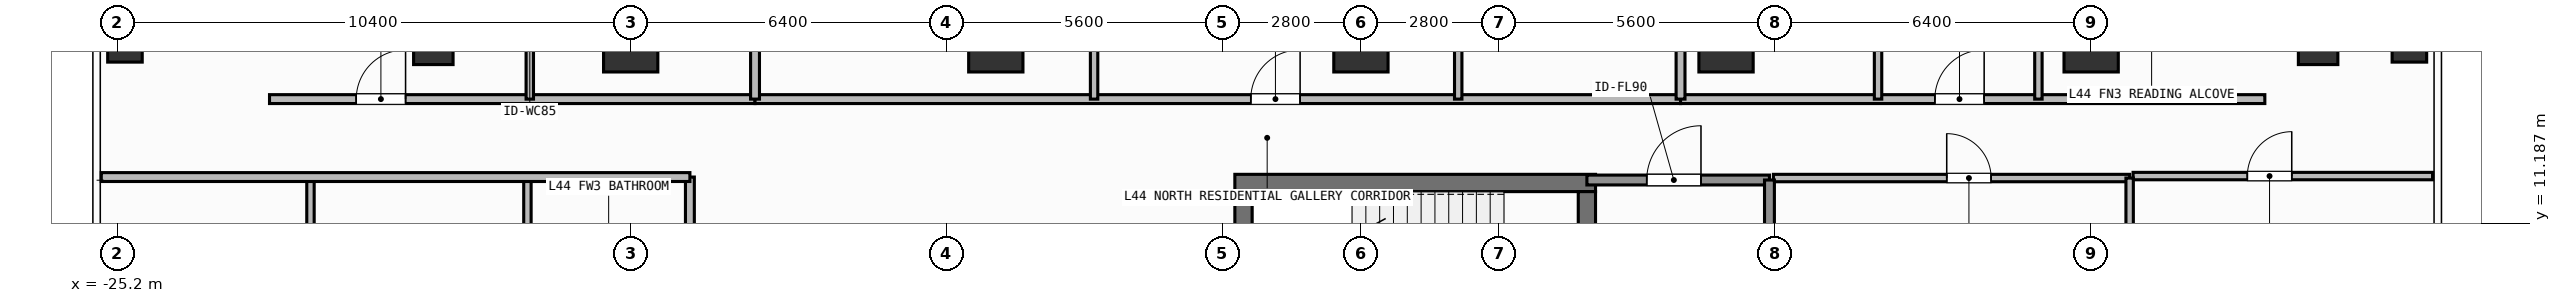
"""IFC4 building model, lengths in metres.
Left out: names, types, materials, properties, quantities, classifications, styles, units other than length and angle.
Written with IfcOpenShell. Run it as: python <this file> out.ifc"""

import sys

from ifc_helpers import new_model, si_unit, direction, frame, frame_2d, origin, origin_2d, place, context, subcontext, project, spatial, rectangle, hollow_rectangle, extrude, element, fill, save


model = new_model("IFC4")
c1 = context("Model", 3, precision=1e-05, world=origin(), true_north=direction((0.0, 1.0)))
c2 = subcontext(c1, "Body", "Model", "MODEL_VIEW")
j1 = project(units=[si_unit("LENGTHUNIT", "METRE"), si_unit("PLANEANGLEUNIT", "RADIAN")], contexts=[c1])
p1 = place(None, origin())
s1 = spatial("IfcSite", under=j1, at=p1, CompositionType="ELEMENT")
p2 = place(p1, origin())
s2 = spatial("IfcBuilding", under=s1, at=p2, CompositionType="ELEMENT")
p3 = place(p2, frame((0.0, 0.0, 179.7)))
s3 = spatial("IfcBuildingStorey", under=s2, at=p3, CompositionType="ELEMENT", Elevation=179.7)
p4 = place(p3, frame((-2.555, 12.0, 0.0), z_axis=(0.0, 0.0, 1.0), x_axis=(1.0, 0.0, 0.0)))
e1 = element("IfcWall", 1, at=p4, inside=s3, PredefinedType="SHEAR", context=c2, shape_type="SweptSolid", body=[
    extrude(rectangle(XDim=7.31, YDim=0.35, at=frame_2d((3.655, 0.0))), origin(), (0.0, 0.0, 1.0), 3.9),
])
p5 = place(p3, frame((-2.38, 8.9, 0.0), z_axis=(0.0, 0.0, 1.0), x_axis=(0.0, 1.0, 0.0)))
e2 = element("IfcWall", 2, at=p5, inside=s3, PredefinedType="SHEAR", context=c2, shape_type="SweptSolid", body=[
    extrude(rectangle(XDim=2.925, YDim=0.35, at=frame_2d((1.462, 0.0))), origin(), (0.0, 0.0, 1.0), 3.9),
])
p6 = place(p3, frame((4.58, 11.825, 0.0), z_axis=(0.0, 0.0, 1.0), x_axis=(0.0, -1.0, 0.0)))
e3 = element("IfcWall", 3, at=p6, inside=s3, PredefinedType="SHEAR", context=c2, shape_type="SweptSolid", body=[
    extrude(rectangle(XDim=2.925, YDim=0.35, at=frame_2d((1.462, 0.0))), origin(), (0.0, 0.0, 1.0), 3.9),
])
p7 = place(p6, frame((0.913, 0.0, 0.0)))
e4 = element("IfcOpeningElement", 4, at=p7, cuts=e3, PredefinedType="OPENING", context=c2, shape_type="SweptSolid", body=[
    extrude(rectangle(XDim=1.1, YDim=2.15, at=frame_2d((0.55, 1.075))), frame((0.0, 0.185, 0.0), z_axis=(0.0, -1.0, 0.0), x_axis=(1.0, 0.0, 0.0)), (0.0, 0.0, 1.0), 0.37),
])
for number, where, z_axis, x_axis in (
    (5, (-14.8, 14.8, 0.0), (0.0, 0.0, 1.0), (1.0, 0.0, 0.0)),
    (6, (-7.4, 14.8, 0.0), (0.0, 0.0, 1.0), (1.0, 0.0, 0.0)),
    (7, (0.0, 14.8, 0.0), (0.0, 0.0, 1.0), (1.0, 0.0, 0.0)),
    (8, (7.4, 14.8, 0.0), (0.0, 0.0, 1.0), (1.0, 0.0, 0.0)),
    (9, (14.8, 14.8, 0.0), (0.0, 0.0, 1.0), (1.0, 0.0, 0.0)),
):
    element("IfcColumn", number, at=place(p3, frame(where, z_axis=z_axis, x_axis=x_axis)), inside=s3, PredefinedType="COLUMN", context=c2, shape_type="SweptSolid", body=[
        extrude(rectangle(XDim=1.1, YDim=1.1, at=origin_2d()), origin(), (0.0, 0.0, 1.0), 3.9),
    ])
for number, where, z_axis, x_axis in (
    (10, (-18.8, 14.8, 0.0), (0.0, 0.0, 1.0), (1.0, 0.0, 0.0)),
    (11, (19.4, 14.8, 0.0), (0.0, 0.0, 1.0), (1.0, 0.0, 0.0)),
):
    element("IfcColumn", number, at=place(p3, frame(where, z_axis=z_axis, x_axis=x_axis)), inside=s3, PredefinedType="COLUMN", context=c2, shape_type="SweptSolid", body=[
        extrude(hollow_rectangle(XDim=0.8, YDim=0.8, WallThickness=0.036, at=origin_2d()), origin(), (0.0, 0.0, 1.0), 3.9),
    ])
for number, where, z_axis, x_axis in (
    (12, (-25.05, 14.8, 0.0), (0.0, 0.0, 1.0), (1.0, 0.0, 0.0)),
    (13, (21.25, 14.8, 0.0), (0.0, 0.0, 1.0), (1.0, 0.0, 0.0)),
):
    element("IfcColumn", number, at=place(p3, frame(where, z_axis=z_axis, x_axis=x_axis)), inside=s3, PredefinedType="COLUMN", context=c2, shape_type="SweptSolid", body=[
        extrude(hollow_rectangle(XDim=0.7, YDim=0.7, WallThickness=0.032, at=origin_2d()), origin(), (0.0, 0.0, 1.0), 3.9),
    ])
p8 = place(p3, frame((4.58, 12.06, 0.0), z_axis=(0.0, 0.0, 1.0), x_axis=(1.0, 0.0, 0.0)))
e14 = element("IfcWall", 14, at=p8, inside=s3, PredefinedType="SOLIDWALL", context=c2, shape_type="SweptSolid", body=[
    extrude(rectangle(XDim=3.7, YDim=0.2, at=frame_2d((1.85, 0.0))), origin(), (0.0, 0.0, 1.0), 3.68),
])
p9 = place(p8, frame((1.212, 0.0, 0.0)))
e15 = element("IfcOpeningElement", 15, at=p9, cuts=e14, PredefinedType="OPENING", context=c2, shape_type="SweptSolid", body=[
    extrude(rectangle(XDim=1.1, YDim=2.15, at=frame_2d((0.55, 1.075))), frame((0.0, 0.11, 0.0), z_axis=(0.0, -1.0, 0.0), x_axis=(1.0, 0.0, 0.0)), (0.0, 0.0, 1.0), 0.22),
])
p10 = place(p3, frame((8.36, 12.1, 0.0), z_axis=(0.0, 0.0, 1.0), x_axis=(1.0, 0.0, 0.0)))
e16 = element("IfcWall", 16, at=p10, inside=s3, PredefinedType="PARTITIONING", context=c2, shape_type="SweptSolid", body=[
    extrude(rectangle(XDim=7.22, YDim=0.15, at=frame_2d((3.61, 0.0))), origin(), (0.0, 0.0, 1.0), 3.68),
])
p11 = place(p10, frame((3.513, 0.0, 0.0)))
e17 = element("IfcOpeningElement", 17, at=p11, cuts=e16, PredefinedType="OPENING", context=c2, shape_type="SweptSolid", body=[
    extrude(rectangle(XDim=0.9, YDim=2.1, at=frame_2d((0.45, 1.05))), frame((0.0, 0.085, 0.0), z_axis=(0.0, -1.0, 0.0), x_axis=(1.0, 0.0, 0.0)), (0.0, 0.0, 1.0), 0.17),
])
p12 = place(p3, frame((-22.12, 13.7, 0.0), z_axis=(0.0, 0.0, 1.0), x_axis=(1.0, 0.0, 0.0)))
e18 = element("IfcWall", 18, at=p12, inside=s3, PredefinedType="PARTITIONING", context=c2, shape_type="SweptSolid", body=[
    extrude(rectangle(XDim=9.84, YDim=0.18, at=frame_2d((4.92, 0.0))), origin(), (0.0, 0.0, 1.0), 3.68),
])
p13 = place(p12, frame((1.758, 0.0, 0.0)))
e19 = element("IfcOpeningElement", 19, at=p13, cuts=e18, PredefinedType="OPENING", context=c2, shape_type="SweptSolid", body=[
    extrude(rectangle(XDim=1.0, YDim=2.2, at=frame_2d((0.5, 1.1))), frame((0.0, 0.1, 0.0), z_axis=(0.0, -1.0, 0.0), x_axis=(1.0, 0.0, 0.0)), (0.0, 0.0, 1.0), 0.2),
])
p14 = place(p3, frame((-16.845, 13.7, 0.0), z_axis=(0.0, 0.0, 1.0), x_axis=(0.0, 1.0, 0.0)))
e20 = element("IfcWall", 20, at=p14, inside=s3, PredefinedType="PARTITIONING", context=c2, shape_type="SweptSolid", body=[
    extrude(rectangle(XDim=3.129, YDim=0.15, at=frame_2d((1.564, 0.0))), origin(), (0.0, 0.0, 1.0), 3.68),
])
p15 = place(p14, frame((1.229, 0.0, 0.0)))
e21 = element("IfcOpeningElement", 21, at=p15, cuts=e20, PredefinedType="OPENING", context=c2, shape_type="SweptSolid", body=[
    extrude(rectangle(XDim=0.85, YDim=2.1, at=frame_2d((0.425, 1.05))), frame((0.0, 0.085, 0.0), z_axis=(0.0, -1.0, 0.0), x_axis=(1.0, 0.0, 0.0)), (0.0, 0.0, 1.0), 0.17),
])
p16 = place(p3, frame((-12.28, 13.7, 0.0), z_axis=(0.0, 0.0, 1.0), x_axis=(1.0, 0.0, 0.0)))
e22 = element("IfcWall", 22, at=p16, inside=s3, PredefinedType="PARTITIONING", context=c2, shape_type="SweptSolid", body=[
    extrude(rectangle(XDim=18.758, YDim=0.18, at=frame_2d((9.379, 0.0))), origin(), (0.0, 0.0, 1.0), 3.68),
])
p17 = place(p16, frame((10.048, 0.0, 0.0)))
e23 = element("IfcOpeningElement", 23, at=p17, cuts=e22, PredefinedType="OPENING", context=c2, shape_type="SweptSolid", body=[
    extrude(rectangle(XDim=1.0, YDim=2.2, at=frame_2d((0.5, 1.1))), frame((0.0, 0.1, 0.0), z_axis=(0.0, -1.0, 0.0), x_axis=(1.0, 0.0, 0.0)), (0.0, 0.0, 1.0), 0.2),
])
p18 = place(p3, frame((-5.408, 13.7, 0.0), z_axis=(0.0, 0.0, 1.0), x_axis=(0.0, 1.0, 0.0)))
e24 = element("IfcWall", 24, at=p18, inside=s3, PredefinedType="PARTITIONING", context=c2, shape_type="SweptSolid", body=[
    extrude(rectangle(XDim=5.69, YDim=0.15, at=frame_2d((2.845, 0.0))), origin(), (0.0, 0.0, 1.0), 3.68),
])
p19 = place(p18, frame((2.42, 0.0, 0.0)))
e25 = element("IfcOpeningElement", 25, at=p19, cuts=e24, PredefinedType="OPENING", context=c2, shape_type="SweptSolid", body=[
    extrude(rectangle(XDim=0.85, YDim=2.1, at=frame_2d((0.425, 1.05))), frame((0.0, 0.085, 0.0), z_axis=(0.0, -1.0, 0.0), x_axis=(1.0, 0.0, 0.0)), (0.0, 0.0, 1.0), 0.17),
])
p20 = place(p3, frame((1.972, 13.7, 0.0), z_axis=(0.0, 0.0, 1.0), x_axis=(0.0, 1.0, 0.0)))
e26 = element("IfcWall", 26, at=p20, inside=s3, PredefinedType="PARTITIONING", context=c2, shape_type="SweptSolid", body=[
    extrude(rectangle(XDim=3.824, YDim=0.15, at=frame_2d((1.912, 0.0))), origin(), (0.0, 0.0, 1.0), 3.68),
])
p21 = place(p20, frame((1.752, 0.0, 0.0)))
e27 = element("IfcOpeningElement", 27, at=p21, cuts=e26, PredefinedType="OPENING", context=c2, shape_type="SweptSolid", body=[
    extrude(rectangle(XDim=0.85, YDim=2.1, at=frame_2d((0.425, 1.05))), frame((0.0, 0.085, 0.0), z_axis=(0.0, -1.0, 0.0), x_axis=(1.0, 0.0, 0.0)), (0.0, 0.0, 1.0), 0.17),
])
p22 = place(p3, frame((6.478, 13.7, 0.0), z_axis=(0.0, 0.0, 1.0), x_axis=(1.0, 0.0, 0.0)))
e28 = element("IfcWall", 28, at=p22, inside=s3, PredefinedType="PARTITIONING", context=c2, shape_type="SweptSolid", body=[
    extrude(rectangle(XDim=11.842, YDim=0.18, at=frame_2d((5.921, 0.0))), origin(), (0.0, 0.0, 1.0), 3.68),
])
p23 = place(p22, frame((5.154, 0.0, 0.0)))
e29 = element("IfcOpeningElement", 29, at=p23, cuts=e28, PredefinedType="OPENING", context=c2, shape_type="SweptSolid", body=[
    extrude(rectangle(XDim=1.0, YDim=2.2, at=frame_2d((0.5, 1.1))), frame((0.0, 0.1, 0.0), z_axis=(0.0, -1.0, 0.0), x_axis=(1.0, 0.0, 0.0)), (0.0, 0.0, 1.0), 0.2),
])
p24 = place(p3, frame((10.481, 13.7, 0.0), z_axis=(0.0, 0.0, 1.0), x_axis=(0.0, 1.0, 0.0)))
e30 = element("IfcWall", 30, at=p24, inside=s3, PredefinedType="PARTITIONING", context=c2, shape_type="SweptSolid", body=[
    extrude(rectangle(XDim=5.69, YDim=0.15, at=frame_2d((2.845, 0.0))), origin(), (0.0, 0.0, 1.0), 3.68),
])
p25 = place(p24, frame((2.42, 0.0, 0.0)))
e31 = element("IfcOpeningElement", 31, at=p25, cuts=e30, PredefinedType="OPENING", context=c2, shape_type="SweptSolid", body=[
    extrude(rectangle(XDim=0.85, YDim=2.1, at=frame_2d((0.425, 1.05))), frame((0.0, 0.085, 0.0), z_axis=(0.0, -1.0, 0.0), x_axis=(1.0, 0.0, 0.0)), (0.0, 0.0, 1.0), 0.17),
])
p26 = place(p3, frame((13.731, 13.7, 0.0), z_axis=(0.0, 0.0, 1.0), x_axis=(0.0, 1.0, 0.0)))
e32 = element("IfcWall", 32, at=p26, inside=s3, PredefinedType="PARTITIONING", context=c2, shape_type="SweptSolid", body=[
    extrude(rectangle(XDim=3.784, YDim=0.15, at=frame_2d((1.892, 0.0))), origin(), (0.0, 0.0, 1.0), 3.68),
])
p27 = place(p26, frame((1.729, 0.0, 0.0)))
e33 = element("IfcOpeningElement", 33, at=p27, cuts=e32, PredefinedType="OPENING", context=c2, shape_type="SweptSolid", body=[
    extrude(rectangle(XDim=0.85, YDim=2.1, at=frame_2d((0.425, 1.05))), frame((0.0, 0.085, 0.0), z_axis=(0.0, -1.0, 0.0), x_axis=(1.0, 0.0, 0.0)), (0.0, 0.0, 1.0), 0.17),
])
p28 = place(p3, frame((-13.6, 4.04, 0.0), z_axis=(0.0, 0.0, 1.0), x_axis=(0.0, 1.0, 0.0)))
e34 = element("IfcWall", 34, at=p28, inside=s3, PredefinedType="PARTITIONING", context=c2, shape_type="SweptSolid", body=[
    extrude(rectangle(XDim=8.08, YDim=0.18, at=frame_2d((4.04, 0.0))), origin(), (0.0, 0.0, 1.0), 3.68),
])
p29 = place(p28, frame((1.761, 0.0, 0.0)))
e35 = element("IfcOpeningElement", 35, at=p29, cuts=e34, PredefinedType="OPENING", context=c2, shape_type="SweptSolid", body=[
    extrude(rectangle(XDim=1.0, YDim=2.2, at=frame_2d((0.5, 1.1))), frame((0.0, 0.1, 0.0), z_axis=(0.0, -1.0, 0.0), x_axis=(1.0, 0.0, 0.0)), (0.0, 0.0, 1.0), 0.2),
])
p30 = place(p3, frame((15.65, 12.14, 0.0), z_axis=(0.0, 0.0, 1.0), x_axis=(1.0, 0.0, 0.0)))
e36 = element("IfcWall", 36, at=p30, inside=s3, PredefinedType="PARTITIONING", context=c2, shape_type="SweptSolid", body=[
    extrude(rectangle(XDim=6.07, YDim=0.15, at=frame_2d((3.035, 0.0))), origin(), (0.0, 0.0, 1.0), 3.68),
])
p31 = place(p30, frame((2.316, 0.0, 0.0)))
e37 = element("IfcOpeningElement", 37, at=p31, cuts=e36, PredefinedType="OPENING", context=c2, shape_type="SweptSolid", body=[
    extrude(rectangle(XDim=0.9, YDim=2.1, at=frame_2d((0.45, 1.05))), frame((0.0, 0.085, 0.0), z_axis=(0.0, -1.0, 0.0), x_axis=(1.0, 0.0, 0.0)), (0.0, 0.0, 1.0), 0.17),
])
p32 = place(p3, frame((8.28, 8.8, 0.0), z_axis=(0.0, 0.0, 1.0), x_axis=(0.0, 1.0, 0.0)))
e38 = element("IfcWall", 38, at=p32, inside=s3, PredefinedType="SOLIDWALL", context=c2, shape_type="SweptSolid", body=[
    extrude(rectangle(XDim=3.26, YDim=0.2, at=frame_2d((1.63, 0.0))), origin(), (0.0, 0.0, 1.0), 3.68),
])
p33 = place(p3, frame((15.58, 5.85, 0.0), z_axis=(0.0, 0.0, 1.0), x_axis=(0.0, 1.0, 0.0)))
e39 = element("IfcWall", 39, at=p33, inside=s3, PredefinedType="PARTITIONING", context=c2, shape_type="SweptSolid", body=[
    extrude(rectangle(XDim=6.25, YDim=0.15, at=frame_2d((3.125, 0.0))), origin(), (0.0, 0.0, 1.0), 3.68),
])
for number, where, z_axis, x_axis in (
    (40, (-12.28, 13.7, 0.0), (0.0, 0.0, 1.0), (0.0, 1.0, 0.0)),
    (41, (6.478, 13.7, 0.0), (0.0, 0.0, 1.0), (0.0, 1.0, 0.0)),
):
    element("IfcWall", number, at=place(p3, frame(where, z_axis=z_axis, x_axis=x_axis)), inside=s3, PredefinedType="PARTITIONING", context=c2, shape_type="SweptSolid", body=[
        extrude(rectangle(XDim=9.93, YDim=0.18, at=frame_2d((4.965, 0.0))), origin(), (0.0, 0.0, 1.0), 3.68),
    ])
for number, where, z_axis, x_axis in (
    (42, (-16.893, 9.32, 0.0), (0.0, 0.0, 1.0), (0.0, 1.0, 0.0)),
    (43, (-21.29, 9.32, 0.0), (0.0, 0.0, 1.0), (0.0, 1.0, 0.0)),
):
    element("IfcWall", number, at=place(p3, frame(where, z_axis=z_axis, x_axis=x_axis)), inside=s3, PredefinedType="PARTITIONING", context=c2, shape_type="SweptSolid", body=[
        extrude(rectangle(XDim=2.8, YDim=0.15, at=frame_2d((1.4, 0.0))), origin(), (0.0, 0.0, 1.0), 3.68),
    ])
p34 = place(p3, frame((-25.53, 12.12, 0.0), z_axis=(0.0, 0.0, 1.0), x_axis=(1.0, 0.0, 0.0)))
e44 = element("IfcWall", 44, at=p34, inside=s3, PredefinedType="PARTITIONING", context=c2, shape_type="SweptSolid", body=[
    extrude(rectangle(XDim=11.93, YDim=0.18, at=frame_2d((5.965, 0.0))), origin(), (0.0, 0.0, 1.0), 3.68),
])
p35 = place(p9, origin())
e45 = element("IfcDoor", 45, at=p35, inside=s3, OperationType="SINGLE_SWING_RIGHT", PredefinedType="DOOR", context=c2, shape_type="SweptSolid", body=[
    extrude(rectangle(XDim=1.1, YDim=2.15, at=frame_2d((0.55, 1.075))), frame((0.0, 0.025, 0.0), z_axis=(0.0, -1.0, 0.0), x_axis=(1.0, 0.0, 0.0)), (0.0, 0.0, 1.0), 0.05),
])
fill(e15, e45)
p36 = place(p11, origin())
e46 = element("IfcDoor", 46, at=p36, inside=s3, OperationType="SINGLE_SWING_LEFT", PredefinedType="DOOR", context=c2, shape_type="SweptSolid", body=[
    extrude(rectangle(XDim=0.9, YDim=2.1, at=frame_2d((0.45, 1.05))), frame((0.0, 0.025, 0.0), z_axis=(0.0, -1.0, 0.0), x_axis=(1.0, 0.0, 0.0)), (0.0, 0.0, 1.0), 0.05),
])
fill(e17, e46)
p37 = place(p13, origin())
e47 = element("IfcDoor", 47, at=p37, inside=s3, OperationType="SINGLE_SWING_RIGHT", PredefinedType="DOOR", context=c2, shape_type="SweptSolid", body=[
    extrude(rectangle(XDim=1.0, YDim=2.2, at=frame_2d((0.5, 1.1))), frame((0.0, 0.025, 0.0), z_axis=(0.0, -1.0, 0.0), x_axis=(1.0, 0.0, 0.0)), (0.0, 0.0, 1.0), 0.05),
])
fill(e19, e47)
p38 = place(p17, origin())
e48 = element("IfcDoor", 48, at=p38, inside=s3, OperationType="SINGLE_SWING_RIGHT", PredefinedType="DOOR", context=c2, shape_type="SweptSolid", body=[
    extrude(rectangle(XDim=1.0, YDim=2.2, at=frame_2d((0.5, 1.1))), frame((0.0, 0.025, 0.0), z_axis=(0.0, -1.0, 0.0), x_axis=(1.0, 0.0, 0.0)), (0.0, 0.0, 1.0), 0.05),
])
fill(e23, e48)
p39 = place(p23, origin())
e49 = element("IfcDoor", 49, at=p39, inside=s3, OperationType="SINGLE_SWING_RIGHT", PredefinedType="DOOR", context=c2, shape_type="SweptSolid", body=[
    extrude(rectangle(XDim=1.0, YDim=2.2, at=frame_2d((0.5, 1.1))), frame((0.0, 0.025, 0.0), z_axis=(0.0, -1.0, 0.0), x_axis=(1.0, 0.0, 0.0)), (0.0, 0.0, 1.0), 0.05),
])
fill(e29, e49)
p40 = place(p31, origin())
e50 = element("IfcDoor", 50, at=p40, inside=s3, OperationType="SINGLE_SWING_RIGHT", PredefinedType="DOOR", context=c2, shape_type="SweptSolid", body=[
    extrude(rectangle(XDim=0.9, YDim=2.1, at=frame_2d((0.45, 1.05))), frame((0.0, 0.025, 0.0), z_axis=(0.0, -1.0, 0.0), x_axis=(1.0, 0.0, 0.0)), (0.0, 0.0, 1.0), 0.05),
])
fill(e37, e50)
save(model, sys.argv[1])
